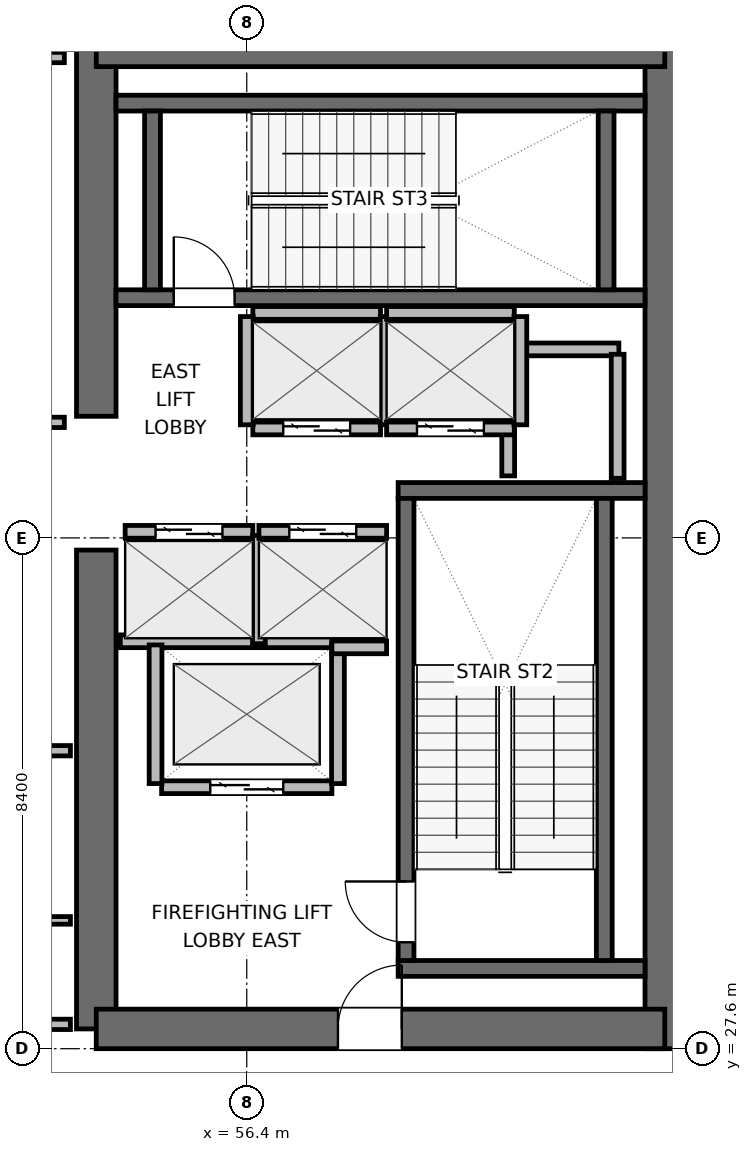
"""IFC4 building model, lengths in metres.
Left out: names, types, materials, properties, quantities, classifications, styles, units other than length and angle.
Written with IfcOpenShell. Run it as: python <this file> out.ifc"""

import sys

from ifc_helpers import new_model, si_unit, direction, frame, frame_2d, origin, place, context, subcontext, project, spatial, rectangle, extrude, element, fill, save


model = new_model("IFC4")
c1 = context("Model", 3, precision=1e-05, world=origin(), true_north=direction((0.0, 1.0)))
c2 = subcontext(c1, "Body", "Model", "MODEL_VIEW")
j1 = project(units=[si_unit("LENGTHUNIT", "METRE"), si_unit("PLANEANGLEUNIT", "RADIAN")], contexts=[c1])
p1 = place(None, origin())
s1 = spatial("IfcSite", under=j1, at=p1, CompositionType="ELEMENT")
p2 = place(p1, origin())
s2 = spatial("IfcBuilding", under=s1, at=p2, CompositionType="ELEMENT")
p3 = place(p2, frame((0.0, 0.0, 214.8)))
s3 = spatial("IfcBuildingStorey", under=s2, at=p3, CompositionType="ELEMENT", Elevation=214.8)
p4 = place(p3, frame((53.925, 27.925, 0.0), z_axis=(0.0, 0.0, 1.0), x_axis=(0.0, 1.0, 0.0)))
e1 = element("IfcWall", 1, at=p4, inside=s3, PredefinedType="SHEAR", context=c2, shape_type="SweptSolid", body=[
    extrude(rectangle(XDim=7.875, YDim=0.65, at=frame_2d((3.938, 0.0))), origin(), (0.0, 0.0, 1.0), 4.5),
])
p5 = place(p3, frame((53.925, 38.0, 0.0), z_axis=(0.0, 0.0, 1.0), x_axis=(0.0, 1.0, 0.0)))
e2 = element("IfcWall", 2, at=p5, inside=s3, PredefinedType="SHEAR", context=c2, shape_type="SweptSolid", body=[
    extrude(rectangle(XDim=6.075, YDim=0.65, at=frame_2d((3.038, 0.0))), origin(), (0.0, 0.0, 1.0), 4.5),
])
p6 = place(p3, frame((63.275, 27.6, 0.0), z_axis=(0.0, 0.0, 1.0), x_axis=(0.0, 1.0, 0.0)))
e3 = element("IfcWall", 3, at=p6, inside=s3, PredefinedType="SHEAR", context=c2, shape_type="SweptSolid", body=[
    extrude(rectangle(XDim=16.8, YDim=0.65, at=frame_2d((8.4, 0.0))), origin(), (0.0, 0.0, 1.0), 4.5),
])
p7 = place(p3, frame((53.925, 27.925, 0.0), z_axis=(0.0, 0.0, 1.0), x_axis=(1.0, 0.0, 0.0)))
e4 = element("IfcWall", 4, at=p7, inside=s3, PredefinedType="SHEAR", context=c2, shape_type="SweptSolid", body=[
    extrude(rectangle(XDim=9.35, YDim=0.65, at=frame_2d((4.675, 0.0))), origin(), (0.0, 0.0, 1.0), 4.5),
])
p8 = place(p7, frame((3.975, 0.0, 0.0)))
e5 = element("IfcOpeningElement", 5, at=p8, cuts=e4, PredefinedType="OPENING", context=c2, shape_type="SweptSolid", body=[
    extrude(rectangle(XDim=1.05, YDim=2.04, at=frame_2d((0.525, 1.02))), frame((0.0, 0.335, 0.0), z_axis=(0.0, -1.0, 0.0), x_axis=(1.0, 0.0, 0.0)), (0.0, 0.0, 1.0), 0.67),
])
p9 = place(p3, frame((53.925, 44.075, 0.0), z_axis=(0.0, 0.0, 1.0), x_axis=(1.0, 0.0, 0.0)))
e6 = element("IfcWall", 6, at=p9, inside=s3, PredefinedType="SHEAR", context=c2, shape_type="SweptSolid", body=[
    extrude(rectangle(XDim=9.35, YDim=0.65, at=frame_2d((4.675, 0.0))), origin(), (0.0, 0.0, 1.0), 4.5),
])
for number, where, z_axis, x_axis in (
    (7, (58.89, 28.92, 0.0), (0.0, 0.0, 1.0), (1.0, 0.0, 0.0)),
    (8, (58.89, 36.78, 0.0), (0.0, 0.0, 1.0), (1.0, 0.0, 0.0)),
):
    element("IfcWall", number, at=place(p3, frame(where, z_axis=z_axis, x_axis=x_axis)), inside=s3, PredefinedType="SHEAR", context=c2, shape_type="SweptSolid", body=[
        extrude(rectangle(XDim=4.06, YDim=0.26, at=frame_2d((2.03, 0.0))), origin(), (0.0, 0.0, 1.0), 4.5),
    ])
p10 = place(p3, frame((59.02, 29.05, 0.0), z_axis=(0.0, 0.0, 1.0), x_axis=(0.0, 1.0, 0.0)))
e9 = element("IfcWall", 9, at=p10, inside=s3, PredefinedType="SHEAR", context=c2, shape_type="SweptSolid", body=[
    extrude(rectangle(XDim=7.6, YDim=0.26, at=frame_2d((3.8, 0.0))), origin(), (0.0, 0.0, 1.0), 4.5),
])
p11 = place(p10, frame((0.3, 0.0, 0.0)))
e10 = element("IfcOpeningElement", 10, at=p11, cuts=e9, PredefinedType="OPENING", context=c2, shape_type="SweptSolid", body=[
    extrude(rectangle(XDim=1.0, YDim=2.04, at=frame_2d((0.5, 1.02))), frame((0.0, 0.14, 0.0), z_axis=(0.0, -1.0, 0.0), x_axis=(1.0, 0.0, 0.0)), (0.0, 0.0, 1.0), 0.28),
])
p12 = place(p3, frame((62.28, 29.05, 0.0), z_axis=(0.0, 0.0, 1.0), x_axis=(0.0, 1.0, 0.0)))
e11 = element("IfcWall", 11, at=p12, inside=s3, PredefinedType="SHEAR", context=c2, shape_type="SweptSolid", body=[
    extrude(rectangle(XDim=7.6, YDim=0.26, at=frame_2d((3.8, 0.0))), origin(), (0.0, 0.0, 1.0), 4.5),
])
p13 = place(p3, frame((54.25, 39.95, 0.0), z_axis=(0.0, 0.0, 1.0), x_axis=(1.0, 0.0, 0.0)))
e12 = element("IfcWall", 12, at=p13, inside=s3, PredefinedType="SHEAR", context=c2, shape_type="SweptSolid", body=[
    extrude(rectangle(XDim=8.7, YDim=0.26, at=frame_2d((4.35, 0.0))), origin(), (0.0, 0.0, 1.0), 4.5),
])
p14 = place(p13, frame((0.95, 0.0, 0.0)))
e13 = element("IfcOpeningElement", 13, at=p14, cuts=e12, PredefinedType="OPENING", context=c2, shape_type="SweptSolid", body=[
    extrude(rectangle(XDim=1.0, YDim=2.04, at=frame_2d((0.5, 1.02))), frame((0.0, 0.14, 0.0), z_axis=(0.0, -1.0, 0.0), x_axis=(1.0, 0.0, 0.0)), (0.0, 0.0, 1.0), 0.28),
])
p15 = place(p3, frame((54.25, 43.15, 0.0), z_axis=(0.0, 0.0, 1.0), x_axis=(1.0, 0.0, 0.0)))
e14 = element("IfcWall", 14, at=p15, inside=s3, PredefinedType="SHEAR", context=c2, shape_type="SweptSolid", body=[
    extrude(rectangle(XDim=8.7, YDim=0.26, at=frame_2d((4.35, 0.0))), origin(), (0.0, 0.0, 1.0), 4.5),
])
for number, where, z_axis, x_axis in (
    (15, (54.85, 40.08, 0.0), (0.0, 0.0, 1.0), (0.0, 1.0, 0.0)),
    (16, (62.31, 40.08, 0.0), (0.0, 0.0, 1.0), (0.0, 1.0, 0.0)),
):
    element("IfcWall", number, at=place(p3, frame(where, z_axis=z_axis, x_axis=x_axis)), inside=s3, PredefinedType="SHEAR", context=c2, shape_type="SweptSolid", body=[
        extrude(rectangle(XDim=2.94, YDim=0.26, at=frame_2d((1.47, 0.0))), origin(), (0.0, 0.0, 1.0), 4.5),
    ])
p16 = place(p3, frame((60.72, 39.1, 0.0), z_axis=(0.0, 0.0, 1.0), x_axis=(1.0, 0.0, 0.0)))
e17 = element("IfcWall", 17, at=p16, inside=s3, PredefinedType="PARTITIONING", context=c2, shape_type="SweptSolid", body=[
    extrude(rectangle(XDim=1.8, YDim=0.21, at=frame_2d((0.9, 0.0))), origin(), (0.0, 0.0, 1.0), 4.28),
])
p17 = place(p3, frame((60.7, 37.02, 0.0), z_axis=(0.0, 0.0, 1.0), x_axis=(0.0, 1.0, 0.0)))
e18 = element("IfcWall", 18, at=p17, inside=s3, PredefinedType="PARTITIONING", context=c2, shape_type="SweptSolid", body=[
    extrude(rectangle(XDim=1.96, YDim=0.21, at=frame_2d((0.98, 0.0))), origin(), (0.0, 0.0, 1.0), 4.28),
])
p18 = place(p3, frame((62.5, 36.98, 0.0), z_axis=(0.0, 0.0, 1.0), x_axis=(0.0, 1.0, 0.0)))
e19 = element("IfcWall", 19, at=p18, inside=s3, PredefinedType="PARTITIONING", context=c2, shape_type="SweptSolid", body=[
    extrude(rectangle(XDim=2.04, YDim=0.21, at=frame_2d((1.02, 0.0))), origin(), (0.0, 0.0, 1.0), 4.28),
])
p19 = place(p3, frame((55.0, 31.9, 0.0), z_axis=(0.0, 0.0, 1.0), x_axis=(1.0, 0.0, 0.0)))
e20 = element("IfcWall", 20, at=p19, inside=s3, PredefinedType="PARTITIONING", context=c2, shape_type="SweptSolid", body=[
    extrude(rectangle(XDim=2.8, YDim=0.21, at=frame_2d((1.4, 0.0))), origin(), (0.0, 0.0, 1.0), 4.28),
])
p20 = place(p19, frame((0.8, 0.0, 0.0)))
e21 = element("IfcOpeningElement", 21, at=p20, cuts=e20, PredefinedType="OPENING", context=c2, shape_type="SweptSolid", body=[
    extrude(rectangle(XDim=1.2, YDim=2.04, at=frame_2d((0.6, 1.02))), frame((0.0, 0.115, 0.0), z_axis=(0.0, -1.0, 0.0), x_axis=(1.0, 0.0, 0.0)), (0.0, 0.0, 1.0), 0.23),
])
p21 = place(p3, frame((54.32, 34.3, 0.0), z_axis=(0.0, 0.0, 1.0), x_axis=(1.0, 0.0, 0.0)))
e22 = element("IfcWall", 22, at=p21, inside=s3, PredefinedType="PARTITIONING", context=c2, shape_type="SweptSolid", body=[
    extrude(rectangle(XDim=3.48, YDim=0.21, at=frame_2d((1.74, 0.0))), origin(), (0.0, 0.0, 1.0), 4.28),
])
for number, where, z_axis, x_axis in (
    (23, (54.9, 31.96, 0.0), (0.0, 0.0, 1.0), (0.0, 1.0, 0.0)),
    (24, (57.9, 31.96, 0.0), (0.0, 0.0, 1.0), (0.0, 1.0, 0.0)),
):
    element("IfcWall", number, at=place(p3, frame(where, z_axis=z_axis, x_axis=x_axis)), inside=s3, PredefinedType="PARTITIONING", context=c2, shape_type="SweptSolid", body=[
        extrude(rectangle(XDim=2.28, YDim=0.21, at=frame_2d((1.14, 0.0))), origin(), (0.0, 0.0, 1.0), 4.28),
    ])
p22 = place(p3, frame((54.4, 36.1, 0.0), z_axis=(0.0, 0.0, 1.0), x_axis=(1.0, 0.0, 0.0)))
e25 = element("IfcWall", 25, at=p22, inside=s3, PredefinedType="PARTITIONING", context=c2, shape_type="SweptSolid", body=[
    extrude(rectangle(XDim=2.1, YDim=0.21, at=frame_2d((1.05, 0.0))), origin(), (0.0, 0.0, 1.0), 4.28),
])
p23 = place(p22, frame((0.5, 0.0, 0.0)))
e26 = element("IfcOpeningElement", 26, at=p23, cuts=e25, PredefinedType="OPENING", context=c2, shape_type="SweptSolid", body=[
    extrude(rectangle(XDim=1.1, YDim=2.04, at=frame_2d((0.55, 1.02))), frame((0.0, 0.115, 0.0), z_axis=(0.0, -1.0, 0.0), x_axis=(1.0, 0.0, 0.0)), (0.0, 0.0, 1.0), 0.23),
])
p24 = place(p3, frame((56.6, 34.26, 0.0), z_axis=(0.0, 0.0, 1.0), x_axis=(0.0, 1.0, 0.0)))
e27 = element("IfcWall", 27, at=p24, inside=s3, PredefinedType="PARTITIONING", context=c2, shape_type="SweptSolid", body=[
    extrude(rectangle(XDim=1.78, YDim=0.21, at=frame_2d((0.89, 0.0))), origin(), (0.0, 0.0, 1.0), 4.28),
])
p25 = place(p3, frame((56.6, 36.1, 0.0), z_axis=(0.0, 0.0, 1.0), x_axis=(1.0, 0.0, 0.0)))
e28 = element("IfcWall", 28, at=p25, inside=s3, PredefinedType="PARTITIONING", context=c2, shape_type="SweptSolid", body=[
    extrude(rectangle(XDim=2.1, YDim=0.21, at=frame_2d((1.05, 0.0))), origin(), (0.0, 0.0, 1.0), 4.28),
])
p26 = place(p25, frame((0.5, 0.0, 0.0)))
e29 = element("IfcOpeningElement", 29, at=p26, cuts=e28, PredefinedType="OPENING", context=c2, shape_type="SweptSolid", body=[
    extrude(rectangle(XDim=1.1, YDim=2.04, at=frame_2d((0.55, 1.02))), frame((0.0, 0.115, 0.0), z_axis=(0.0, -1.0, 0.0), x_axis=(1.0, 0.0, 0.0)), (0.0, 0.0, 1.0), 0.23),
])
p27 = place(p3, frame((57.8, 34.2, 0.0), z_axis=(0.0, 0.0, 1.0), x_axis=(1.0, 0.0, 0.0)))
e30 = element("IfcWall", 30, at=p27, inside=s3, PredefinedType="PARTITIONING", context=c2, shape_type="SweptSolid", body=[
    extrude(rectangle(XDim=0.9, YDim=0.21, at=frame_2d((0.45, 0.0))), origin(), (0.0, 0.0, 1.0), 4.28),
])
p28 = place(p3, frame((56.5, 37.8, 0.0), z_axis=(0.0, 0.0, 1.0), x_axis=(1.0, 0.0, 0.0)))
e31 = element("IfcWall", 31, at=p28, inside=s3, PredefinedType="PARTITIONING", context=c2, shape_type="SweptSolid", body=[
    extrude(rectangle(XDim=2.1, YDim=0.21, at=frame_2d((1.05, 0.0))), origin(), (0.0, 0.0, 1.0), 4.28),
])
p29 = place(p28, frame((0.5, 0.0, 0.0)))
e32 = element("IfcOpeningElement", 32, at=p29, cuts=e31, PredefinedType="OPENING", context=c2, shape_type="SweptSolid", body=[
    extrude(rectangle(XDim=1.1, YDim=2.04, at=frame_2d((0.55, 1.02))), frame((0.0, 0.115, 0.0), z_axis=(0.0, -1.0, 0.0), x_axis=(1.0, 0.0, 0.0)), (0.0, 0.0, 1.0), 0.23),
])
p30 = place(p3, frame((56.5, 39.7, 0.0), z_axis=(0.0, 0.0, 1.0), x_axis=(1.0, 0.0, 0.0)))
e33 = element("IfcWall", 33, at=p30, inside=s3, PredefinedType="PARTITIONING", context=c2, shape_type="SweptSolid", body=[
    extrude(rectangle(XDim=2.1, YDim=0.21, at=frame_2d((1.05, 0.0))), origin(), (0.0, 0.0, 1.0), 4.28),
])
for number, where, z_axis, x_axis in (
    (34, (56.4, 37.86, 0.0), (0.0, 0.0, 1.0), (0.0, 1.0, 0.0)),
    (35, (58.7, 37.86, 0.0), (0.0, 0.0, 1.0), (0.0, 1.0, 0.0)),
):
    element("IfcWall", number, at=place(p3, frame(where, z_axis=z_axis, x_axis=x_axis)), inside=s3, PredefinedType="PARTITIONING", context=c2, shape_type="SweptSolid", body=[
        extrude(rectangle(XDim=1.78, YDim=0.21, at=frame_2d((0.89, 0.0))), origin(), (0.0, 0.0, 1.0), 4.28),
    ])
p31 = place(p3, frame((58.7, 37.8, 0.0), z_axis=(0.0, 0.0, 1.0), x_axis=(1.0, 0.0, 0.0)))
e36 = element("IfcWall", 36, at=p31, inside=s3, PredefinedType="PARTITIONING", context=c2, shape_type="SweptSolid", body=[
    extrude(rectangle(XDim=2.1, YDim=0.21, at=frame_2d((1.05, 0.0))), origin(), (0.0, 0.0, 1.0), 4.28),
])
p32 = place(p31, frame((0.5, 0.0, 0.0)))
e37 = element("IfcOpeningElement", 37, at=p32, cuts=e36, PredefinedType="OPENING", context=c2, shape_type="SweptSolid", body=[
    extrude(rectangle(XDim=1.1, YDim=2.04, at=frame_2d((0.55, 1.02))), frame((0.0, 0.115, 0.0), z_axis=(0.0, -1.0, 0.0), x_axis=(1.0, 0.0, 0.0)), (0.0, 0.0, 1.0), 0.23),
])
p33 = place(p3, frame((58.7, 39.7, 0.0), z_axis=(0.0, 0.0, 1.0), x_axis=(1.0, 0.0, 0.0)))
e38 = element("IfcWall", 38, at=p33, inside=s3, PredefinedType="PARTITIONING", context=c2, shape_type="SweptSolid", body=[
    extrude(rectangle(XDim=2.1, YDim=0.21, at=frame_2d((1.05, 0.0))), origin(), (0.0, 0.0, 1.0), 4.28),
])
p34 = place(p3, frame((60.9, 37.86, 0.0), z_axis=(0.0, 0.0, 1.0), x_axis=(0.0, 1.0, 0.0)))
e39 = element("IfcWall", 39, at=p34, inside=s3, PredefinedType="PARTITIONING", context=c2, shape_type="SweptSolid", body=[
    extrude(rectangle(XDim=1.78, YDim=0.21, at=frame_2d((0.89, 0.0))), origin(), (0.0, 0.0, 1.0), 4.28),
])
p35 = place(p3, frame((49.287, 28.0, 0.0), z_axis=(0.0, 0.0, 1.0), x_axis=(1.0, 0.0, 0.0)))
e40 = element("IfcWall", 40, at=p35, inside=s3, PredefinedType="PARTITIONING", context=c2, shape_type="SweptSolid", body=[
    extrude(rectangle(XDim=4.213, YDim=0.17, at=frame_2d((2.106, 0.0))), origin(), (0.0, 0.0, 1.0), 3.365),
])
p36 = place(p3, frame((52.2, 32.5, 0.0), z_axis=(0.0, 0.0, 1.0), x_axis=(1.0, 0.0, 0.0)))
e41 = element("IfcWall", 41, at=p36, inside=s3, PredefinedType="PARTITIONING", context=c2, shape_type="SweptSolid", body=[
    extrude(rectangle(XDim=1.3, YDim=0.17, at=frame_2d((0.65, 0.0))), origin(), (0.0, 0.0, 1.0), 4.28),
])
p37 = place(p3, frame((49.287, 29.71, 0.0), z_axis=(0.0, 0.0, 1.0), x_axis=(1.0, 0.0, 0.0)))
e42 = element("IfcWall", 42, at=p37, inside=s3, PredefinedType="PARTITIONING", context=c2, shape_type="SweptSolid", body=[
    extrude(rectangle(XDim=4.213, YDim=0.125, at=frame_2d((2.106, 0.0))), origin(), (0.0, 0.0, 1.0), 4.28),
])
p38 = place(p3, frame((49.287, 37.9, 0.0), z_axis=(0.0, 0.0, 1.0), x_axis=(1.0, 0.0, 0.0)))
e43 = element("IfcWall", 43, at=p38, inside=s3, PredefinedType="PARTITIONING", context=c2, shape_type="SweptSolid", body=[
    extrude(rectangle(XDim=4.113, YDim=0.17, at=frame_2d((2.056, 0.0))), origin(), (0.0, 0.0, 1.0), 4.28),
])
p39 = place(p3, frame((49.287, 43.9, 0.0), z_axis=(0.0, 0.0, 1.0), x_axis=(1.0, 0.0, 0.0)))
e44 = element("IfcWall", 44, at=p39, inside=s3, PredefinedType="PARTITIONING", context=c2, shape_type="SweptSolid", body=[
    extrude(rectangle(XDim=4.113, YDim=0.17, at=frame_2d((2.056, 0.0))), origin(), (0.0, 0.0, 1.0), 3.365),
])
p40 = place(p11, origin())
e45 = element("IfcDoor", 45, at=p40, inside=s3, OperationType="SINGLE_SWING_RIGHT", PredefinedType="DOOR", context=c2, shape_type="SweptSolid", body=[
    extrude(rectangle(XDim=1.0, YDim=2.04, at=frame_2d((0.5, 1.02))), frame((0.0, 0.025, 0.0), z_axis=(0.0, -1.0, 0.0), x_axis=(1.0, 0.0, 0.0)), (0.0, 0.0, 1.0), 0.05),
])
fill(e10, e45)
p41 = place(p14, origin())
e46 = element("IfcDoor", 46, at=p41, inside=s3, OperationType="SINGLE_SWING_LEFT", PredefinedType="DOOR", context=c2, shape_type="SweptSolid", body=[
    extrude(rectangle(XDim=1.0, YDim=2.04, at=frame_2d((0.5, 1.02))), frame((0.0, 0.025, 0.0), z_axis=(0.0, -1.0, 0.0), x_axis=(1.0, 0.0, 0.0)), (0.0, 0.0, 1.0), 0.05),
])
fill(e13, e46)
p42 = place(p20, origin())
e47 = element("IfcDoor", 47, at=p42, inside=s3, OperationType="DOUBLE_DOOR_SLIDING", PredefinedType="DOOR", context=c2, shape_type="SweptSolid", body=[
    extrude(rectangle(XDim=1.2, YDim=2.04, at=frame_2d((0.6, 1.02))), frame((0.0, 0.025, 0.0), z_axis=(0.0, -1.0, 0.0), x_axis=(1.0, 0.0, 0.0)), (0.0, 0.0, 1.0), 0.05),
])
fill(e21, e47)
p43 = place(p23, origin())
e48 = element("IfcDoor", 48, at=p43, inside=s3, OperationType="DOUBLE_DOOR_SLIDING", PredefinedType="DOOR", context=c2, shape_type="SweptSolid", body=[
    extrude(rectangle(XDim=1.1, YDim=2.04, at=frame_2d((0.55, 1.02))), frame((0.0, 0.025, 0.0), z_axis=(0.0, -1.0, 0.0), x_axis=(1.0, 0.0, 0.0)), (0.0, 0.0, 1.0), 0.05),
])
fill(e26, e48)
p44 = place(p26, origin())
e49 = element("IfcDoor", 49, at=p44, inside=s3, OperationType="DOUBLE_DOOR_SLIDING", PredefinedType="DOOR", context=c2, shape_type="SweptSolid", body=[
    extrude(rectangle(XDim=1.1, YDim=2.04, at=frame_2d((0.55, 1.02))), frame((0.0, 0.025, 0.0), z_axis=(0.0, -1.0, 0.0), x_axis=(1.0, 0.0, 0.0)), (0.0, 0.0, 1.0), 0.05),
])
fill(e29, e49)
p45 = place(p29, origin())
e50 = element("IfcDoor", 50, at=p45, inside=s3, OperationType="DOUBLE_DOOR_SLIDING", PredefinedType="DOOR", context=c2, shape_type="SweptSolid", body=[
    extrude(rectangle(XDim=1.1, YDim=2.04, at=frame_2d((0.55, 1.02))), frame((0.0, 0.025, 0.0), z_axis=(0.0, -1.0, 0.0), x_axis=(1.0, 0.0, 0.0)), (0.0, 0.0, 1.0), 0.05),
])
fill(e32, e50)
p46 = place(p32, origin())
e51 = element("IfcDoor", 51, at=p46, inside=s3, OperationType="DOUBLE_DOOR_SLIDING", PredefinedType="DOOR", context=c2, shape_type="SweptSolid", body=[
    extrude(rectangle(XDim=1.1, YDim=2.04, at=frame_2d((0.55, 1.02))), frame((0.0, 0.025, 0.0), z_axis=(0.0, -1.0, 0.0), x_axis=(1.0, 0.0, 0.0)), (0.0, 0.0, 1.0), 0.05),
])
fill(e37, e51)
p47 = place(p8, origin())
e52 = element("IfcDoor", 52, at=p47, inside=s3, OperationType="SINGLE_SWING_RIGHT", PredefinedType="DOOR", context=c2, shape_type="SweptSolid", body=[
    extrude(rectangle(XDim=1.05, YDim=2.04, at=frame_2d((0.525, 1.02))), frame((0.0, 0.025, 0.0), z_axis=(0.0, -1.0, 0.0), x_axis=(1.0, 0.0, 0.0)), (0.0, 0.0, 1.0), 0.05),
])
fill(e5, e52)
save(model, sys.argv[1])
